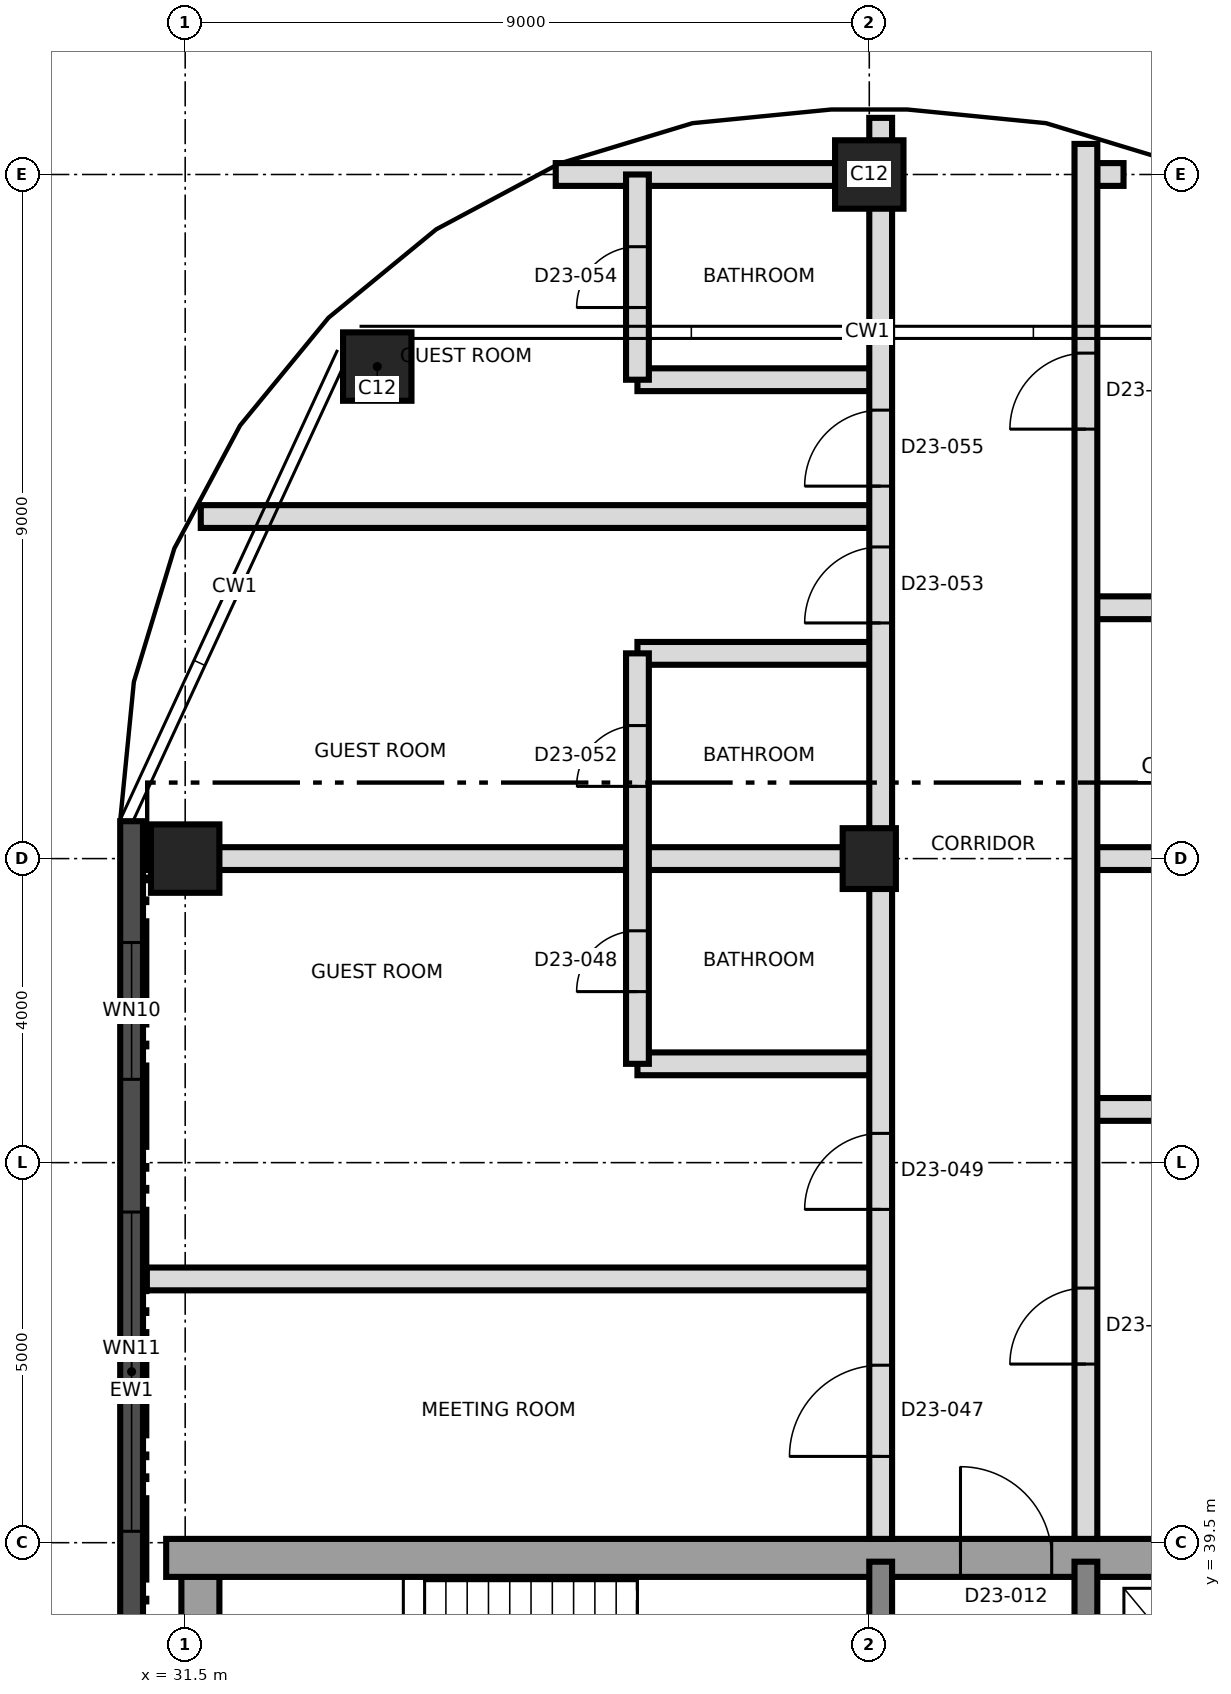
"""IFC4 building model, lengths in metres.
Left out: names, types, materials, properties, quantities, classifications, styles, units other than length and angle.
Written with IfcOpenShell. Run it as: python <this file> out.ifc"""

import sys

from ifc_helpers import new_model, si_unit, direction, frame, frame_2d, origin, origin_2d, place, context, subcontext, project, spatial, rectangle, extrude, element, fill, save


model = new_model("IFC4")
c1 = context("Model", 3, precision=1e-05, world=origin(), true_north=direction((0.0, 1.0)))
c2 = subcontext(c1, "Body", "Model", "MODEL_VIEW")
j1 = project(units=[si_unit("LENGTHUNIT", "METRE"), si_unit("PLANEANGLEUNIT", "RADIAN")], contexts=[c1])
p1 = place(None, origin())
s1 = spatial("IfcSite", under=j1, at=p1, CompositionType="ELEMENT")
p2 = place(p1, origin())
s2 = spatial("IfcBuilding", under=s1, at=p2, CompositionType="ELEMENT")
p3 = place(p2, frame((0.0, 0.0, 206.9)))
s3 = spatial("IfcBuildingStorey", under=s2, at=p3, CompositionType="ELEMENT", Elevation=206.9)
p4 = place(p3, frame((31.7, 21.75, 0.0), z_axis=(0.0, 0.0, 1.0), x_axis=(0.0, 1.0, 0.0)))
e1 = element("IfcWall", 1, at=p4, inside=s3, PredefinedType="SHEAR", context=c2, shape_type="SweptSolid", body=[
    extrude(rectangle(XDim=17.5, YDim=0.5, at=frame_2d((8.75, 0.0))), origin(), (0.0, 0.0, 1.0), 3.7),
])
p5 = place(p3, frame((31.25, 39.3, 0.0), z_axis=(0.0, 0.0, 1.0), x_axis=(1.0, 0.0, 0.0)))
e2 = element("IfcWall", 2, at=p5, inside=s3, PredefinedType="SHEAR", context=c2, shape_type="SweptSolid", body=[
    extrude(rectangle(XDim=27.0, YDim=0.5, at=frame_2d((13.5, 0.0))), origin(), (0.0, 0.0, 1.0), 3.7),
])
p6 = place(p5, frame((10.45, 0.0, 0.0)))
e3 = element("IfcOpeningElement", 3, at=p6, cuts=e2, PredefinedType="OPENING", context=c2, shape_type="SweptSolid", body=[
    extrude(rectangle(XDim=1.2, YDim=2.1, at=frame_2d((0.6, 1.05))), frame((0.0, 0.26, 0.0), z_axis=(0.0, -1.0, 0.0), x_axis=(1.0, 0.0, 0.0)), (0.0, 0.0, 1.0), 0.52),
])
for number, where, z_axis, x_axis in (
    (4, (40.65, 33.5, 0.0), (0.0, 0.0, 1.0), (0.0, 1.0, 0.0)),
    (5, (43.35, 33.5, 0.0), (0.0, 0.0, 1.0), (0.0, 1.0, 0.0)),
):
    element("IfcWall", number, at=place(p3, frame(where, z_axis=z_axis, x_axis=x_axis)), inside=s3, PredefinedType="SHEAR", context=c2, shape_type="SweptSolid", body=[
        extrude(rectangle(XDim=5.75, YDim=0.3, at=frame_2d((2.875, 0.0))), origin(), (0.0, 0.0, 1.0), 3.7),
    ])
p7 = place(p3, frame((31.5, 48.5, 0.0), z_axis=(0.0, 0.0, 1.0), x_axis=(1.0, 0.0, 0.0)))
e6 = element("IfcColumn", 6, at=p7, inside=s3, PredefinedType="COLUMN", context=c2, shape_type="SweptSolid", body=[
    extrude(rectangle(XDim=0.9, YDim=0.9, at=origin_2d()), origin(), (0.0, 0.0, 1.0), 3.7),
])
p8 = place(p3, frame((40.5, 48.5, 0.0), z_axis=(0.0, 0.0, 1.0), x_axis=(0.0, 1.0, 0.0)))
e7 = element("IfcColumn", 7, at=p8, inside=s3, PredefinedType="COLUMN", context=c2, shape_type="SweptSolid", body=[
    extrude(rectangle(XDim=0.8, YDim=0.7, at=origin_2d()), origin(), (0.0, 0.0, 1.0), 3.7),
])
for number, where, z_axis, x_axis in (
    (8, (34.027, 54.973, 0.0), (0.0, 0.0, 1.0), (1.0, 0.0, 0.0)),
    (9, (40.5, 57.5, 0.0), (0.0, 0.0, 1.0), (1.0, 0.0, 0.0)),
):
    element("IfcColumn", number, at=place(p3, frame(where, z_axis=z_axis, x_axis=x_axis)), inside=s3, PredefinedType="COLUMN", context=c2, shape_type="SweptSolid", body=[
        extrude(rectangle(XDim=0.9, YDim=0.9, at=origin_2d()), origin(), (0.0, 0.0, 1.0), 3.7),
    ])
p9 = place(p3, frame((30.795, 48.992, 0.0), z_axis=(0.0, 0.0, 1.0), x_axis=(0.0, -1.0, 0.0)))
e10 = element("IfcWall", 10, at=p9, inside=s3, PredefinedType="SOLIDWALL", context=c2, shape_type="SweptSolid", body=[
    extrude(rectangle(XDim=14.981, YDim=0.3, at=frame_2d((7.491, 0.0))), origin(), (0.0, 0.0, 1.0), 3.4),
])
p10 = place(p9, frame((1.596, 0.0, 0.3)))
e11 = element("IfcOpeningElement", 11, at=p10, cuts=e10, PredefinedType="OPENING", context=c2, shape_type="SweptSolid", body=[
    extrude(rectangle(XDim=1.8, YDim=2.4, at=frame_2d((0.9, 1.2))), frame((0.0, 0.16, 0.0), z_axis=(0.0, -1.0, 0.0), x_axis=(1.0, 0.0, 0.0)), (0.0, 0.0, 1.0), 0.32),
])
p11 = place(p9, frame((5.142, 0.0, 0.9)))
e12 = element("IfcOpeningElement", 12, at=p11, cuts=e10, PredefinedType="OPENING", context=c2, shape_type="SweptSolid", body=[
    extrude(rectangle(XDim=4.2, YDim=1.5, at=frame_2d((2.1, 0.75))), frame((0.0, 0.16, 0.0), z_axis=(0.0, -1.0, 0.0), x_axis=(1.0, 0.0, 0.0)), (0.0, 0.0, 1.0), 0.32),
])
p12 = place(p9, frame((11.337, 0.0, 0.3)))
e13 = element("IfcOpeningElement", 13, at=p12, cuts=e10, PredefinedType="OPENING", context=c2, shape_type="SweptSolid", body=[
    extrude(rectangle(XDim=1.8, YDim=2.4, at=frame_2d((0.9, 1.2))), frame((0.0, 0.16, 0.0), z_axis=(0.0, -1.0, 0.0), x_axis=(1.0, 0.0, 0.0)), (0.0, 0.0, 1.0), 0.32),
])
p13 = place(p3, frame((30.995, 42.97, 0.0), z_axis=(0.0, 0.0, 1.0), x_axis=(1.0, 0.0, 0.0)))
e14 = element("IfcWall", 14, at=p13, inside=s3, PredefinedType="PARTITIONING", context=c2, shape_type="SweptSolid", body=[
    extrude(rectangle(XDim=9.655, YDim=0.3, at=frame_2d((4.827, 0.0))), origin(), (0.0, 0.0, 1.0), 3.4),
])
p14 = place(p3, frame((43.35, 45.2, 0.0), z_axis=(0.0, 0.0, 1.0), x_axis=(1.0, 0.0, 0.0)))
e15 = element("IfcWall", 15, at=p14, inside=s3, PredefinedType="PARTITIONING", context=c2, shape_type="SweptSolid", body=[
    extrude(rectangle(XDim=3.5, YDim=0.3, at=frame_2d((1.75, 0.0))), origin(), (0.0, 0.0, 1.0), 3.4),
])
p15 = place(p3, frame((37.45, 45.8, 0.0), z_axis=(0.0, 0.0, 1.0), x_axis=(1.0, 0.0, 0.0)))
e16 = element("IfcWall", 16, at=p15, inside=s3, PredefinedType="PARTITIONING", context=c2, shape_type="SweptSolid", body=[
    extrude(rectangle(XDim=3.2, YDim=0.3, at=frame_2d((1.6, 0.0))), origin(), (0.0, 0.0, 1.0), 3.4),
])
p16 = place(p3, frame((30.995, 48.5, 0.0), z_axis=(0.0, 0.0, 1.0), x_axis=(1.0, 0.0, 0.0)))
e17 = element("IfcWall", 17, at=p16, inside=s3, PredefinedType="PARTITIONING", context=c2, shape_type="SweptSolid", body=[
    extrude(rectangle(XDim=9.655, YDim=0.3, at=frame_2d((4.827, 0.0))), origin(), (0.0, 0.0, 1.0), 3.4),
])
p17 = place(p3, frame((43.35, 48.5, 0.0), z_axis=(0.0, 0.0, 1.0), x_axis=(1.0, 0.0, 0.0)))
e18 = element("IfcWall", 18, at=p17, inside=s3, PredefinedType="PARTITIONING", context=c2, shape_type="SweptSolid", body=[
    extrude(rectangle(XDim=6.835, YDim=0.3, at=frame_2d((3.417, 0.0))), origin(), (0.0, 0.0, 1.0), 3.4),
])
p18 = place(p3, frame((37.45, 51.2, 0.0), z_axis=(0.0, 0.0, 1.0), x_axis=(1.0, 0.0, 0.0)))
e19 = element("IfcWall", 19, at=p18, inside=s3, PredefinedType="PARTITIONING", context=c2, shape_type="SweptSolid", body=[
    extrude(rectangle(XDim=3.2, YDim=0.3, at=frame_2d((1.6, 0.0))), origin(), (0.0, 0.0, 1.0), 3.4),
])
p19 = place(p3, frame((43.35, 51.8, 0.0), z_axis=(0.0, 0.0, 1.0), x_axis=(1.0, 0.0, 0.0)))
e20 = element("IfcWall", 20, at=p19, inside=s3, PredefinedType="PARTITIONING", context=c2, shape_type="SweptSolid", body=[
    extrude(rectangle(XDim=3.5, YDim=0.3, at=frame_2d((1.75, 0.0))), origin(), (0.0, 0.0, 1.0), 3.4),
])
p20 = place(p3, frame((31.705, 53.0, 0.0), z_axis=(0.0, 0.0, 1.0), x_axis=(1.0, 0.0, 0.0)))
e21 = element("IfcWall", 21, at=p20, inside=s3, PredefinedType="PARTITIONING", context=c2, shape_type="SweptSolid", body=[
    extrude(rectangle(XDim=8.945, YDim=0.3, at=frame_2d((4.472, 0.0))), origin(), (0.0, 0.0, 1.0), 3.4),
])
p21 = place(p3, frame((37.45, 54.8, 0.0), z_axis=(0.0, 0.0, 1.0), x_axis=(1.0, 0.0, 0.0)))
e22 = element("IfcWall", 22, at=p21, inside=s3, PredefinedType="PARTITIONING", context=c2, shape_type="SweptSolid", body=[
    extrude(rectangle(XDim=3.2, YDim=0.3, at=frame_2d((1.6, 0.0))), origin(), (0.0, 0.0, 1.0), 3.4),
])
p22 = place(p3, frame((36.375, 57.5, 0.0), z_axis=(0.0, 0.0, 1.0), x_axis=(1.0, 0.0, 0.0)))
e23 = element("IfcWall", 23, at=p22, inside=s3, PredefinedType="PARTITIONING", context=c2, shape_type="SweptSolid", body=[
    extrude(rectangle(XDim=4.275, YDim=0.3, at=frame_2d((2.137, 0.0))), origin(), (0.0, 0.0, 1.0), 3.4),
])
p23 = place(p3, frame((43.498, 57.5, 0.0), z_axis=(0.0, 0.0, 1.0), x_axis=(1.0, 0.0, 0.0)))
e24 = element("IfcWall", 24, at=p23, inside=s3, PredefinedType="PARTITIONING", context=c2, shape_type="SweptSolid", body=[
    extrude(rectangle(XDim=0.347, YDim=0.3, at=frame_2d((0.173, 0.0))), origin(), (0.0, 0.0, 1.0), 3.4),
])
p24 = place(p3, frame((37.45, 45.8, 0.0), z_axis=(0.0, 0.0, 1.0), x_axis=(0.0, 1.0, 0.0)))
e25 = element("IfcWall", 25, at=p24, inside=s3, PredefinedType="PARTITIONING", context=c2, shape_type="SweptSolid", body=[
    extrude(rectangle(XDim=5.4, YDim=0.3, at=frame_2d((2.7, 0.0))), origin(), (0.0, 0.0, 1.0), 3.4),
])
p25 = place(p24, frame((0.95, 0.0, 0.0)))
e26 = element("IfcOpeningElement", 26, at=p25, cuts=e25, PredefinedType="OPENING", context=c2, shape_type="SweptSolid", body=[
    extrude(rectangle(XDim=0.8, YDim=2.1, at=frame_2d((0.4, 1.05))), frame((0.0, 0.16, 0.0), z_axis=(0.0, -1.0, 0.0), x_axis=(1.0, 0.0, 0.0)), (0.0, 0.0, 1.0), 0.32),
])
p26 = place(p24, frame((3.65, 0.0, 0.0)))
e27 = element("IfcOpeningElement", 27, at=p26, cuts=e25, PredefinedType="OPENING", context=c2, shape_type="SweptSolid", body=[
    extrude(rectangle(XDim=0.8, YDim=2.1, at=frame_2d((0.4, 1.05))), frame((0.0, 0.16, 0.0), z_axis=(0.0, -1.0, 0.0), x_axis=(1.0, 0.0, 0.0)), (0.0, 0.0, 1.0), 0.32),
])
p27 = place(p3, frame((37.45, 54.8, 0.0), z_axis=(0.0, 0.0, 1.0), x_axis=(0.0, 1.0, 0.0)))
e28 = element("IfcWall", 28, at=p27, inside=s3, PredefinedType="PARTITIONING", context=c2, shape_type="SweptSolid", body=[
    extrude(rectangle(XDim=2.7, YDim=0.3, at=frame_2d((1.35, 0.0))), origin(), (0.0, 0.0, 1.0), 3.4),
])
p28 = place(p27, frame((0.95, 0.0, 0.0)))
e29 = element("IfcOpeningElement", 29, at=p28, cuts=e28, PredefinedType="OPENING", context=c2, shape_type="SweptSolid", body=[
    extrude(rectangle(XDim=0.8, YDim=2.1, at=frame_2d((0.4, 1.05))), frame((0.0, 0.16, 0.0), z_axis=(0.0, -1.0, 0.0), x_axis=(1.0, 0.0, 0.0)), (0.0, 0.0, 1.0), 0.32),
])
p29 = place(p3, frame((40.65, 39.55, 0.0), z_axis=(0.0, 0.0, 1.0), x_axis=(0.0, 1.0, 0.0)))
e30 = element("IfcWall", 30, at=p29, inside=s3, PredefinedType="PARTITIONING", context=c2, shape_type="SweptSolid", body=[
    extrude(rectangle(XDim=18.695, YDim=0.3, at=frame_2d((9.348, 0.0))), origin(), (0.0, 0.0, 1.0), 3.4),
])
p30 = place(p29, frame((1.085, 0.0, 0.0)))
e31 = element("IfcOpeningElement", 31, at=p30, cuts=e30, PredefinedType="OPENING", context=c2, shape_type="SweptSolid", body=[
    extrude(rectangle(XDim=1.2, YDim=2.1, at=frame_2d((0.6, 1.05))), frame((0.0, 0.16, 0.0), z_axis=(0.0, -1.0, 0.0), x_axis=(1.0, 0.0, 0.0)), (0.0, 0.0, 1.0), 0.32),
])
p31 = place(p29, frame((4.335, 0.0, 0.0)))
e32 = element("IfcOpeningElement", 32, at=p31, cuts=e30, PredefinedType="OPENING", context=c2, shape_type="SweptSolid", body=[
    extrude(rectangle(XDim=1.0, YDim=2.1, at=frame_2d((0.5, 1.05))), frame((0.0, 0.16, 0.0), z_axis=(0.0, -1.0, 0.0), x_axis=(1.0, 0.0, 0.0)), (0.0, 0.0, 1.0), 0.32),
])
p32 = place(p29, frame((12.05, 0.0, 0.0)))
e33 = element("IfcOpeningElement", 33, at=p32, cuts=e30, PredefinedType="OPENING", context=c2, shape_type="SweptSolid", body=[
    extrude(rectangle(XDim=1.0, YDim=2.1, at=frame_2d((0.5, 1.05))), frame((0.0, 0.16, 0.0), z_axis=(0.0, -1.0, 0.0), x_axis=(1.0, 0.0, 0.0)), (0.0, 0.0, 1.0), 0.32),
])
p33 = place(p29, frame((13.85, 0.0, 0.0)))
e34 = element("IfcOpeningElement", 34, at=p33, cuts=e30, PredefinedType="OPENING", context=c2, shape_type="SweptSolid", body=[
    extrude(rectangle(XDim=1.0, YDim=2.1, at=frame_2d((0.5, 1.05))), frame((0.0, 0.16, 0.0), z_axis=(0.0, -1.0, 0.0), x_axis=(1.0, 0.0, 0.0)), (0.0, 0.0, 1.0), 0.32),
])
p34 = place(p3, frame((43.35, 39.55, 0.0), z_axis=(0.0, 0.0, 1.0), x_axis=(0.0, 1.0, 0.0)))
e35 = element("IfcWall", 35, at=p34, inside=s3, PredefinedType="PARTITIONING", context=c2, shape_type="SweptSolid", body=[
    extrude(rectangle(XDim=18.352, YDim=0.3, at=frame_2d((9.176, 0.0))), origin(), (0.0, 0.0, 1.0), 3.4),
])
p35 = place(p34, frame((2.3, 0.0, 0.0)))
e36 = element("IfcOpeningElement", 36, at=p35, cuts=e35, PredefinedType="OPENING", context=c2, shape_type="SweptSolid", body=[
    extrude(rectangle(XDim=1.0, YDim=2.4, at=frame_2d((0.5, 1.2))), frame((0.0, 0.16, 0.0), z_axis=(0.0, -1.0, 0.0), x_axis=(1.0, 0.0, 0.0)), (0.0, 0.0, 1.0), 0.32),
])
p36 = place(p34, frame((14.6, 0.0, 0.0)))
e37 = element("IfcOpeningElement", 37, at=p36, cuts=e35, PredefinedType="OPENING", context=c2, shape_type="SweptSolid", body=[
    extrude(rectangle(XDim=1.0, YDim=2.4, at=frame_2d((0.5, 1.2))), frame((0.0, 0.16, 0.0), z_axis=(0.0, -1.0, 0.0), x_axis=(1.0, 0.0, 0.0)), (0.0, 0.0, 1.0), 0.32),
])
p37 = place(p10, origin())
e38 = element("IfcWindow", 38, at=p37, inside=s3, PartitioningType="SINGLE_PANEL", PredefinedType="WINDOW", context=c2, shape_type="SweptSolid", body=[
    extrude(rectangle(XDim=1.8, YDim=2.4, at=frame_2d((0.9, 1.2))), frame((0.0, 0.03, 0.0), z_axis=(0.0, -1.0, 0.0), x_axis=(1.0, 0.0, 0.0)), (0.0, 0.0, 1.0), 0.06),
])
fill(e11, e38)
p38 = place(p11, origin())
e39 = element("IfcWindow", 39, at=p38, inside=s3, PartitioningType="SINGLE_PANEL", PredefinedType="WINDOW", context=c2, shape_type="SweptSolid", body=[
    extrude(rectangle(XDim=4.2, YDim=1.5, at=frame_2d((2.1, 0.75))), frame((0.0, 0.03, 0.0), z_axis=(0.0, -1.0, 0.0), x_axis=(1.0, 0.0, 0.0)), (0.0, 0.0, 1.0), 0.06),
])
fill(e12, e39)
p39 = place(p6, origin())
e40 = element("IfcDoor", 40, at=p39, inside=s3, OperationType="SINGLE_SWING_RIGHT", PredefinedType="DOOR", context=c2, shape_type="SweptSolid", body=[
    extrude(rectangle(XDim=1.2, YDim=2.1, at=frame_2d((0.6, 1.05))), frame((0.0, 0.025, 0.0), z_axis=(0.0, -1.0, 0.0), x_axis=(1.0, 0.0, 0.0)), (0.0, 0.0, 1.0), 0.05),
])
fill(e3, e40)
p40 = place(p35, origin())
e41 = element("IfcDoor", 41, at=p40, inside=s3, OperationType="SINGLE_SWING_LEFT", PredefinedType="DOOR", context=c2, shape_type="SweptSolid", body=[
    extrude(rectangle(XDim=1.0, YDim=2.4, at=frame_2d((0.5, 1.2))), frame((0.0, 0.025, 0.0), z_axis=(0.0, -1.0, 0.0), x_axis=(1.0, 0.0, 0.0)), (0.0, 0.0, 1.0), 0.05),
])
fill(e36, e41)
p41 = place(p30, origin())
e42 = element("IfcDoor", 42, at=p41, inside=s3, OperationType="SINGLE_SWING_RIGHT", PredefinedType="DOOR", context=c2, shape_type="SweptSolid", body=[
    extrude(rectangle(XDim=1.2, YDim=2.1, at=frame_2d((0.6, 1.05))), frame((0.0, 0.025, 0.0), z_axis=(0.0, -1.0, 0.0), x_axis=(1.0, 0.0, 0.0)), (0.0, 0.0, 1.0), 0.05),
])
fill(e31, e42)
p42 = place(p25, origin())
e43 = element("IfcDoor", 43, at=p42, inside=s3, OperationType="SINGLE_SWING_LEFT", PredefinedType="DOOR", context=c2, shape_type="SweptSolid", body=[
    extrude(rectangle(XDim=0.8, YDim=2.1, at=frame_2d((0.4, 1.05))), frame((0.0, 0.025, 0.0), z_axis=(0.0, -1.0, 0.0), x_axis=(1.0, 0.0, 0.0)), (0.0, 0.0, 1.0), 0.05),
])
fill(e26, e43)
p43 = place(p31, origin())
e44 = element("IfcDoor", 44, at=p43, inside=s3, OperationType="SINGLE_SWING_LEFT", PredefinedType="DOOR", context=c2, shape_type="SweptSolid", body=[
    extrude(rectangle(XDim=1.0, YDim=2.1, at=frame_2d((0.5, 1.05))), frame((0.0, 0.025, 0.0), z_axis=(0.0, -1.0, 0.0), x_axis=(1.0, 0.0, 0.0)), (0.0, 0.0, 1.0), 0.05),
])
fill(e32, e44)
p44 = place(p36, origin())
e45 = element("IfcDoor", 45, at=p44, inside=s3, OperationType="SINGLE_SWING_RIGHT", PredefinedType="DOOR", context=c2, shape_type="SweptSolid", body=[
    extrude(rectangle(XDim=1.0, YDim=2.4, at=frame_2d((0.5, 1.2))), frame((0.0, 0.025, 0.0), z_axis=(0.0, -1.0, 0.0), x_axis=(1.0, 0.0, 0.0)), (0.0, 0.0, 1.0), 0.05),
])
fill(e37, e45)
p45 = place(p26, origin())
e46 = element("IfcDoor", 46, at=p45, inside=s3, OperationType="SINGLE_SWING_RIGHT", PredefinedType="DOOR", context=c2, shape_type="SweptSolid", body=[
    extrude(rectangle(XDim=0.8, YDim=2.1, at=frame_2d((0.4, 1.05))), frame((0.0, 0.025, 0.0), z_axis=(0.0, -1.0, 0.0), x_axis=(1.0, 0.0, 0.0)), (0.0, 0.0, 1.0), 0.05),
])
fill(e27, e46)
p46 = place(p32, origin())
e47 = element("IfcDoor", 47, at=p46, inside=s3, OperationType="SINGLE_SWING_LEFT", PredefinedType="DOOR", context=c2, shape_type="SweptSolid", body=[
    extrude(rectangle(XDim=1.0, YDim=2.1, at=frame_2d((0.5, 1.05))), frame((0.0, 0.025, 0.0), z_axis=(0.0, -1.0, 0.0), x_axis=(1.0, 0.0, 0.0)), (0.0, 0.0, 1.0), 0.05),
])
fill(e33, e47)
p47 = place(p28, origin())
e48 = element("IfcDoor", 48, at=p47, inside=s3, OperationType="SINGLE_SWING_LEFT", PredefinedType="DOOR", context=c2, shape_type="SweptSolid", body=[
    extrude(rectangle(XDim=0.8, YDim=2.1, at=frame_2d((0.4, 1.05))), frame((0.0, 0.025, 0.0), z_axis=(0.0, -1.0, 0.0), x_axis=(1.0, 0.0, 0.0)), (0.0, 0.0, 1.0), 0.05),
])
fill(e29, e48)
p48 = place(p33, origin())
e49 = element("IfcDoor", 49, at=p48, inside=s3, OperationType="SINGLE_SWING_LEFT", PredefinedType="DOOR", context=c2, shape_type="SweptSolid", body=[
    extrude(rectangle(XDim=1.0, YDim=2.1, at=frame_2d((0.5, 1.05))), frame((0.0, 0.025, 0.0), z_axis=(0.0, -1.0, 0.0), x_axis=(1.0, 0.0, 0.0)), (0.0, 0.0, 1.0), 0.05),
])
fill(e34, e49)
save(model, sys.argv[1])
